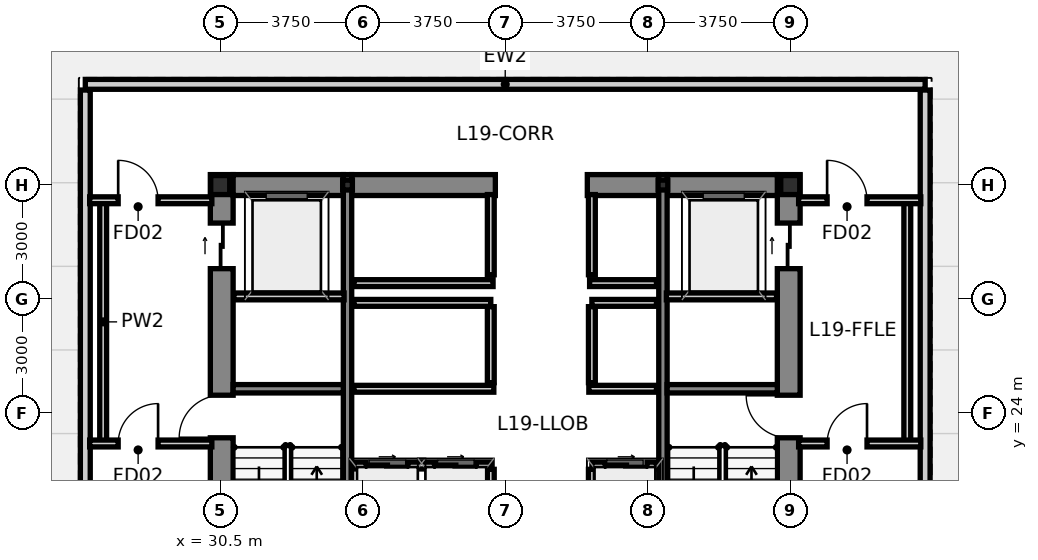
"""IFC4 building model, lengths in metres.
Left out: names, types, materials, properties, quantities, classifications, styles, units other than length and angle.
Written with IfcOpenShell. Run it as: python <this file> out.ifc"""

import sys

from ifc_helpers import new_model, si_unit, direction, frame, frame_2d, origin, origin_2d, place, context, subcontext, project, spatial, rectangle, i_section, extrude, source, transform, mapped, element, fill, save


model = new_model("IFC4")
c1 = context("Model", 3, precision=1e-05, world=origin(), true_north=direction((0.0, 1.0)))
c2 = subcontext(c1, "Body", "Model", "MODEL_VIEW")
j1 = project(units=[si_unit("LENGTHUNIT", "METRE"), si_unit("PLANEANGLEUNIT", "RADIAN")], contexts=[c1])
p1 = place(None, origin())
s1 = spatial("IfcSite", under=j1, at=p1, CompositionType="ELEMENT")
p2 = place(p1, origin())
s2 = spatial("IfcBuilding", under=s1, at=p2, CompositionType="ELEMENT")
p3 = place(p2, frame((0.0, 0.0, 75.05)))
s3 = spatial("IfcBuildingStorey", under=s2, at=p3, CompositionType="ELEMENT", Elevation=75.05)
m1 = source(origin(), c2, "Body", "SweptSolid", [
    extrude(i_section(OverallWidth=0.5, OverallDepth=0.5, WebThickness=0.028, FlangeThickness=0.04, at=origin_2d()), origin(), (0.0, 0.0, 1.0), 4.8),
])
for number, where, z_axis, x_axis in (
    (1, (45.5, 30.0, 0.0), (0.0, 0.0, 1.0), (1.0, 0.0, 0.0)),
    (2, (30.5, 30.0, 0.0), (0.0, 0.0, 1.0), (1.0, 0.0, 0.0)),
):
    element("IfcColumn", number, at=place(p3, frame(where, z_axis=z_axis, x_axis=x_axis)), inside=s3, PredefinedType="COLUMN", context=c2, shape_type="MappedRepresentation", body=[
        mapped(m1, transform((0.0, 0.0, 0.0), scale=1.0)),
    ])
m2 = source(origin(), c2, "Body", "SweptSolid", [
    extrude(i_section(OverallWidth=0.256, OverallDepth=0.26, WebThickness=0.01, FlangeThickness=0.017, at=origin_2d()), origin(), (0.0, 0.0, 1.0), 4.8),
])
for number, where, z_axis, x_axis in (
    (3, (33.85, 30.0, 0.0), (0.0, 0.0, 1.0), (1.0, 0.0, 0.0)),
    (4, (42.15, 30.0, 0.0), (0.0, 0.0, 1.0), (1.0, 0.0, 0.0)),
):
    element("IfcColumn", number, at=place(p3, frame(where, z_axis=z_axis, x_axis=x_axis)), inside=s3, PredefinedType="COLUMN", context=c2, shape_type="MappedRepresentation", body=[
        mapped(m2, transform((0.0, 0.0, 0.0), scale=1.0)),
    ])
p4 = place(p3, frame((30.54, 16.85, 0.0), z_axis=(0.0, 0.0, 1.0), x_axis=(0.0, 1.0, 0.0)))
e5 = element("IfcWall", 5, at=p4, inside=s3, PredefinedType="SHEAR", context=c2, shape_type="SweptSolid", body=[
    extrude(rectangle(XDim=13.425, YDim=0.6, at=frame_2d((6.712, 0.0))), origin(), (0.0, 0.0, 1.0), 4.8),
])
p5 = place(p4, frame((6.5, 0.0, 0.0)))
e6 = element("IfcOpeningElement", 6, at=p5, cuts=e5, PredefinedType="OPENING", context=c2, shape_type="SweptSolid", body=[
    extrude(rectangle(XDim=1.12, YDim=2.15, at=frame_2d((0.56, 1.075))), frame((0.0, 0.312, 0.0), z_axis=(0.0, -1.0, 0.0), x_axis=(1.0, 0.0, 0.0)), (0.0, 0.0, 1.0), 0.624),
])
p6 = place(p4, frame((10.95, 0.0, 0.0)))
e7 = element("IfcOpeningElement", 7, at=p6, cuts=e5, PredefinedType="OPENING", context=c2, shape_type="SweptSolid", body=[
    extrude(rectangle(XDim=1.2, YDim=2.2, at=frame_2d((0.6, 1.1))), frame((0.0, 0.312, 0.0), z_axis=(0.0, -1.0, 0.0), x_axis=(1.0, 0.0, 0.0)), (0.0, 0.0, 1.0), 0.624),
])
p7 = place(p3, frame((45.46, 16.85, 0.0), z_axis=(0.0, 0.0, 1.0), x_axis=(0.0, 1.0, 0.0)))
e8 = element("IfcWall", 8, at=p7, inside=s3, PredefinedType="SHEAR", context=c2, shape_type="SweptSolid", body=[
    extrude(rectangle(XDim=13.425, YDim=0.6, at=frame_2d((6.712, 0.0))), origin(), (0.0, 0.0, 1.0), 4.8),
])
p8 = place(p7, frame((6.5, 0.0, 0.0)))
e9 = element("IfcOpeningElement", 9, at=p8, cuts=e8, PredefinedType="OPENING", context=c2, shape_type="SweptSolid", body=[
    extrude(rectangle(XDim=1.12, YDim=2.15, at=frame_2d((0.56, 1.075))), frame((0.0, 0.312, 0.0), z_axis=(0.0, -1.0, 0.0), x_axis=(1.0, 0.0, 0.0)), (0.0, 0.0, 1.0), 0.624),
])
p9 = place(p7, frame((10.95, 0.0, 0.0)))
e10 = element("IfcOpeningElement", 10, at=p9, cuts=e8, PredefinedType="OPENING", context=c2, shape_type="SweptSolid", body=[
    extrude(rectangle(XDim=1.2, YDim=2.2, at=frame_2d((0.6, 1.1))), frame((0.0, 0.312, 0.0), z_axis=(0.0, -1.0, 0.0), x_axis=(1.0, 0.0, 0.0)), (0.0, 0.0, 1.0), 0.624),
])
p10 = place(p3, frame((30.84, 30.0, 0.0), z_axis=(0.0, 0.0, 1.0), x_axis=(1.0, 0.0, 0.0)))
e11 = element("IfcWall", 11, at=p10, inside=s3, PredefinedType="SHEAR", context=c2, shape_type="SweptSolid", body=[
    extrude(rectangle(XDim=2.9, YDim=0.55, at=frame_2d((1.45, 0.0))), origin(), (0.0, 0.0, 1.0), 4.8),
])
p11 = place(p3, frame((33.96, 30.0, 0.0), z_axis=(0.0, 0.0, 1.0), x_axis=(1.0, 0.0, 0.0)))
e12 = element("IfcWall", 12, at=p11, inside=s3, PredefinedType="SHEAR", context=c2, shape_type="SweptSolid", body=[
    extrude(rectangle(XDim=3.78, YDim=0.55, at=frame_2d((1.89, 0.0))), origin(), (0.0, 0.0, 1.0), 4.8),
])
p12 = place(p3, frame((40.16, 30.0, 0.0), z_axis=(0.0, 0.0, 1.0), x_axis=(1.0, 0.0, 0.0)))
e13 = element("IfcWall", 13, at=p12, inside=s3, PredefinedType="SHEAR", context=c2, shape_type="SweptSolid", body=[
    extrude(rectangle(XDim=1.88, YDim=0.55, at=frame_2d((0.94, 0.0))), origin(), (0.0, 0.0, 1.0), 4.8),
])
p13 = place(p3, frame((42.26, 30.0, 0.0), z_axis=(0.0, 0.0, 1.0), x_axis=(1.0, 0.0, 0.0)))
e14 = element("IfcWall", 14, at=p13, inside=s3, PredefinedType="SHEAR", context=c2, shape_type="SweptSolid", body=[
    extrude(rectangle(XDim=2.9, YDim=0.55, at=frame_2d((1.45, 0.0))), origin(), (0.0, 0.0, 1.0), 4.8),
])
for number, where, z_axis, x_axis in (
    (15, (33.85, 16.85, 0.0), (0.0, 0.0, 1.0), (0.0, 1.0, 0.0)),
    (16, (42.15, 16.85, 0.0), (0.0, 0.0, 1.0), (0.0, 1.0, 0.0)),
):
    element("IfcWall", number, at=place(p3, frame(where, z_axis=z_axis, x_axis=x_axis)), inside=s3, PredefinedType="SHEAR", context=c2, shape_type="SweptSolid", body=[
        extrude(rectangle(XDim=13.425, YDim=0.22, at=frame_2d((6.712, 0.0))), origin(), (0.0, 0.0, 1.0), 4.8),
    ])
for number, where, z_axis, x_axis in (
    (17, (30.84, 24.64, 0.0), (0.0, 0.0, 1.0), (1.0, 0.0, 0.0)),
    (18, (42.26, 24.64, 0.0), (0.0, 0.0, 1.0), (1.0, 0.0, 0.0)),
):
    element("IfcWall", number, at=place(p3, frame(where, z_axis=z_axis, x_axis=x_axis)), inside=s3, PredefinedType="SHEAR", context=c2, shape_type="SweptSolid", body=[
        extrude(rectangle(XDim=2.9, YDim=0.22, at=frame_2d((1.45, 0.0))), origin(), (0.0, 0.0, 1.0), 4.8),
    ])
p14 = place(p3, frame((26.95, 32.65, 0.0), z_axis=(0.0, 0.0, 1.0), x_axis=(1.0, 0.0, 0.0)))
e19 = element("IfcWall", 19, at=p14, inside=s3, PredefinedType="STANDARD", context=c2, shape_type="SweptSolid", body=[
    extrude(rectangle(XDim=22.1, YDim=0.26, at=frame_2d((11.05, 0.0))), origin(), (0.0, 0.0, 1.0), 4.176),
])
p15 = place(p3, frame((26.95, 15.5, 0.0), z_axis=(0.0, 0.0, 1.0), x_axis=(0.0, 1.0, 0.0)))
e20 = element("IfcWall", 20, at=p15, inside=s3, PredefinedType="STANDARD", context=c2, shape_type="SweptSolid", body=[
    extrude(rectangle(XDim=17.0, YDim=0.26, at=frame_2d((8.5, 0.0))), origin(), (0.0, 0.0, 1.0), 4.176),
])
p16 = place(p15, frame((3.5, 0.0, 0.0)))
e21 = element("IfcOpeningElement", 21, at=p16, cuts=e20, PredefinedType="OPENING", context=c2, shape_type="SweptSolid", body=[
    extrude(rectangle(XDim=1.1, YDim=2.2, at=frame_2d((0.55, 1.1))), frame((0.0, 0.142, 0.0), z_axis=(0.0, -1.0, 0.0), x_axis=(1.0, 0.0, 0.0)), (0.0, 0.0, 1.0), 0.284),
])
p17 = place(p3, frame((49.05, 15.5, 0.0), z_axis=(0.0, 0.0, 1.0), x_axis=(0.0, 1.0, 0.0)))
e22 = element("IfcWall", 22, at=p17, inside=s3, PredefinedType="STANDARD", context=c2, shape_type="SweptSolid", body=[
    extrude(rectangle(XDim=17.0, YDim=0.26, at=frame_2d((8.5, 0.0))), origin(), (0.0, 0.0, 1.0), 4.176),
])
p18 = place(p17, frame((3.5, 0.0, 0.0)))
e23 = element("IfcOpeningElement", 23, at=p18, cuts=e22, PredefinedType="OPENING", context=c2, shape_type="SweptSolid", body=[
    extrude(rectangle(XDim=1.1, YDim=2.2, at=frame_2d((0.55, 1.1))), frame((0.0, 0.142, 0.0), z_axis=(0.0, -1.0, 0.0), x_axis=(1.0, 0.0, 0.0)), (0.0, 0.0, 1.0), 0.284),
])
p19 = place(p3, frame((34.02, 22.62, 0.0), z_axis=(0.0, 0.0, 1.0), x_axis=(1.0, 0.0, 0.0)))
e24 = element("IfcWall", 24, at=p19, inside=s3, PredefinedType="PARTITIONING", context=c2, shape_type="SweptSolid", body=[
    extrude(rectangle(XDim=3.6, YDim=0.18, at=frame_2d((1.8, 0.0))), origin(), (0.0, 0.0, 1.0), 4.55),
])
p20 = place(p19, frame((0.32, 0.0, 0.0)))
e25 = element("IfcOpeningElement", 25, at=p20, cuts=e24, PredefinedType="OPENING", context=c2, shape_type="SweptSolid", body=[
    extrude(rectangle(XDim=1.1, YDim=2.2, at=frame_2d((0.55, 1.1))), frame((0.0, 0.102, 0.0), z_axis=(0.0, -1.0, 0.0), x_axis=(1.0, 0.0, 0.0)), (0.0, 0.0, 1.0), 0.204),
])
p21 = place(p19, frame((2.12, 0.0, 0.0)))
e26 = element("IfcOpeningElement", 26, at=p21, cuts=e24, PredefinedType="OPENING", context=c2, shape_type="SweptSolid", body=[
    extrude(rectangle(XDim=1.1, YDim=2.2, at=frame_2d((0.55, 1.1))), frame((0.0, 0.102, 0.0), z_axis=(0.0, -1.0, 0.0), x_axis=(1.0, 0.0, 0.0)), (0.0, 0.0, 1.0), 0.204),
])
p22 = place(p3, frame((40.28, 22.62, 0.0), z_axis=(0.0, 0.0, 1.0), x_axis=(1.0, 0.0, 0.0)))
e27 = element("IfcWall", 27, at=p22, inside=s3, PredefinedType="PARTITIONING", context=c2, shape_type="SweptSolid", body=[
    extrude(rectangle(XDim=1.7, YDim=0.18, at=frame_2d((0.85, 0.0))), origin(), (0.0, 0.0, 1.0), 4.55),
])
p23 = place(p22, frame((0.35, 0.0, 0.0)))
e28 = element("IfcOpeningElement", 28, at=p23, cuts=e27, PredefinedType="OPENING", context=c2, shape_type="SweptSolid", body=[
    extrude(rectangle(XDim=1.1, YDim=2.2, at=frame_2d((0.55, 1.1))), frame((0.0, 0.102, 0.0), z_axis=(0.0, -1.0, 0.0), x_axis=(1.0, 0.0, 0.0)), (0.0, 0.0, 1.0), 0.204),
])
for number, where, z_axis, x_axis in (
    (29, (37.62, 20.52, 0.0), (0.0, 0.0, 1.0), (0.0, 1.0, 0.0)),
    (30, (40.28, 20.52, 0.0), (0.0, 0.0, 1.0), (0.0, 1.0, 0.0)),
):
    element("IfcWall", number, at=place(p3, frame(where, z_axis=z_axis, x_axis=x_axis)), inside=s3, PredefinedType="PARTITIONING", context=c2, shape_type="SweptSolid", body=[
        extrude(rectangle(XDim=2.0, YDim=0.18, at=frame_2d((1.0, 0.0))), origin(), (0.0, 0.0, 1.0), 4.55),
    ])
p24 = place(p3, frame((34.02, 26.9, 0.0), z_axis=(0.0, 0.0, 1.0), x_axis=(1.0, 0.0, 0.0)))
e31 = element("IfcWall", 31, at=p24, inside=s3, PredefinedType="PARTITIONING", context=c2, shape_type="SweptSolid", body=[
    extrude(rectangle(XDim=3.6, YDim=0.18, at=frame_2d((1.8, 0.0))), origin(), (0.0, 0.0, 1.0), 4.55),
])
p25 = place(p3, frame((40.28, 26.9, 0.0), z_axis=(0.0, 0.0, 1.0), x_axis=(1.0, 0.0, 0.0)))
e32 = element("IfcWall", 32, at=p25, inside=s3, PredefinedType="PARTITIONING", context=c2, shape_type="SweptSolid", body=[
    extrude(rectangle(XDim=1.7, YDim=0.18, at=frame_2d((0.85, 0.0))), origin(), (0.0, 0.0, 1.0), 4.55),
])
for number, where, z_axis, x_axis in (
    (33, (37.62, 24.8, 0.0), (0.0, 0.0, 1.0), (0.0, 1.0, 0.0)),
    (34, (40.28, 24.8, 0.0), (0.0, 0.0, 1.0), (0.0, 1.0, 0.0)),
):
    element("IfcWall", number, at=place(p3, frame(where, z_axis=z_axis, x_axis=x_axis)), inside=s3, PredefinedType="PARTITIONING", context=c2, shape_type="SweptSolid", body=[
        extrude(rectangle(XDim=2.0, YDim=0.18, at=frame_2d((1.0, 0.0))), origin(), (0.0, 0.0, 1.0), 4.55),
    ])
p26 = place(p3, frame((34.02, 24.64, 0.0), z_axis=(0.0, 0.0, 1.0), x_axis=(1.0, 0.0, 0.0)))
e35 = element("IfcWall", 35, at=p26, inside=s3, PredefinedType="PARTITIONING", context=c2, shape_type="SweptSolid", body=[
    extrude(rectangle(XDim=3.68, YDim=0.18, at=frame_2d((1.84, 0.0))), origin(), (0.0, 0.0, 1.0), 4.55),
])
p27 = place(p3, frame((40.2, 24.64, 0.0), z_axis=(0.0, 0.0, 1.0), x_axis=(1.0, 0.0, 0.0)))
e36 = element("IfcWall", 36, at=p27, inside=s3, PredefinedType="PARTITIONING", context=c2, shape_type="SweptSolid", body=[
    extrude(rectangle(XDim=1.78, YDim=0.18, at=frame_2d((0.89, 0.0))), origin(), (0.0, 0.0, 1.0), 4.55),
])
p28 = place(p3, frame((34.02, 27.42, 0.0), z_axis=(0.0, 0.0, 1.0), x_axis=(1.0, 0.0, 0.0)))
e37 = element("IfcWall", 37, at=p28, inside=s3, PredefinedType="PARTITIONING", context=c2, shape_type="SweptSolid", body=[
    extrude(rectangle(XDim=3.66, YDim=0.18, at=frame_2d((1.83, 0.0))), origin(), (0.0, 0.0, 1.0), 4.55),
])
p29 = place(p3, frame((40.22, 27.42, 0.0), z_axis=(0.0, 0.0, 1.0), x_axis=(1.0, 0.0, 0.0)))
e38 = element("IfcWall", 38, at=p29, inside=s3, PredefinedType="PARTITIONING", context=c2, shape_type="SweptSolid", body=[
    extrude(rectangle(XDim=1.76, YDim=0.18, at=frame_2d((0.88, 0.0))), origin(), (0.0, 0.0, 1.0), 4.55),
])
for number, where, z_axis, x_axis in (
    (39, (37.62, 27.64, 0.0), (0.0, 0.0, 1.0), (0.0, 1.0, 0.0)),
    (40, (40.28, 27.64, 0.0), (0.0, 0.0, 1.0), (0.0, 1.0, 0.0)),
):
    element("IfcWall", number, at=place(p3, frame(where, z_axis=z_axis, x_axis=x_axis)), inside=s3, PredefinedType="PARTITIONING", context=c2, shape_type="SweptSolid", body=[
        extrude(rectangle(XDim=2.11, YDim=0.18, at=frame_2d((1.055, 0.0))), origin(), (0.0, 0.0, 1.0), 4.55),
    ])
p30 = place(p3, frame((27.42, 23.2, 0.0), z_axis=(0.0, 0.0, 1.0), x_axis=(0.0, 1.0, 0.0)))
e41 = element("IfcWall", 41, at=p30, inside=s3, PredefinedType="PARTITIONING", context=c2, shape_type="SweptSolid", body=[
    extrude(rectangle(XDim=6.4, YDim=0.18, at=frame_2d((3.2, 0.0))), origin(), (0.0, 0.0, 1.0), 4.176),
])
p31 = place(p3, frame((27.065, 23.2, 0.0), z_axis=(0.0, 0.0, 1.0), x_axis=(1.0, 0.0, 0.0)))
e42 = element("IfcWall", 42, at=p31, inside=s3, PredefinedType="PARTITIONING", context=c2, shape_type="SweptSolid", body=[
    extrude(rectangle(XDim=3.215, YDim=0.18, at=frame_2d((1.607, 0.0))), origin(), (0.0, 0.0, 1.0), 4.55),
])
p32 = place(p31, frame((0.75, 0.0, 0.0)))
e43 = element("IfcOpeningElement", 43, at=p32, cuts=e42, PredefinedType="OPENING", context=c2, shape_type="SweptSolid", body=[
    extrude(rectangle(XDim=1.05, YDim=2.15, at=frame_2d((0.525, 1.075))), frame((0.0, 0.102, 0.0), z_axis=(0.0, -1.0, 0.0), x_axis=(1.0, 0.0, 0.0)), (0.0, 0.0, 1.0), 0.204),
])
p33 = place(p3, frame((27.065, 29.6, 0.0), z_axis=(0.0, 0.0, 1.0), x_axis=(1.0, 0.0, 0.0)))
e44 = element("IfcWall", 44, at=p33, inside=s3, PredefinedType="PARTITIONING", context=c2, shape_type="SweptSolid", body=[
    extrude(rectangle(XDim=3.215, YDim=0.18, at=frame_2d((1.607, 0.0))), origin(), (0.0, 0.0, 1.0), 3.933),
])
p34 = place(p33, frame((0.75, 0.0, 0.0)))
e45 = element("IfcOpeningElement", 45, at=p34, cuts=e44, PredefinedType="OPENING", context=c2, shape_type="SweptSolid", body=[
    extrude(rectangle(XDim=1.05, YDim=2.15, at=frame_2d((0.525, 1.075))), frame((0.0, 0.102, 0.0), z_axis=(0.0, -1.0, 0.0), x_axis=(1.0, 0.0, 0.0)), (0.0, 0.0, 1.0), 0.204),
])
p35 = place(p3, frame((48.58, 23.2, 0.0), z_axis=(0.0, 0.0, 1.0), x_axis=(0.0, 1.0, 0.0)))
e46 = element("IfcWall", 46, at=p35, inside=s3, PredefinedType="PARTITIONING", context=c2, shape_type="SweptSolid", body=[
    extrude(rectangle(XDim=6.4, YDim=0.18, at=frame_2d((3.2, 0.0))), origin(), (0.0, 0.0, 1.0), 4.176),
])
p36 = place(p3, frame((45.72, 23.2, 0.0), z_axis=(0.0, 0.0, 1.0), x_axis=(1.0, 0.0, 0.0)))
e47 = element("IfcWall", 47, at=p36, inside=s3, PredefinedType="PARTITIONING", context=c2, shape_type="SweptSolid", body=[
    extrude(rectangle(XDim=3.215, YDim=0.18, at=frame_2d((1.607, 0.0))), origin(), (0.0, 0.0, 1.0), 4.55),
])
p37 = place(p36, frame((0.75, 0.0, 0.0)))
e48 = element("IfcOpeningElement", 48, at=p37, cuts=e47, PredefinedType="OPENING", context=c2, shape_type="SweptSolid", body=[
    extrude(rectangle(XDim=1.05, YDim=2.15, at=frame_2d((0.525, 1.075))), frame((0.0, 0.102, 0.0), z_axis=(0.0, -1.0, 0.0), x_axis=(1.0, 0.0, 0.0)), (0.0, 0.0, 1.0), 0.204),
])
p38 = place(p3, frame((45.72, 29.6, 0.0), z_axis=(0.0, 0.0, 1.0), x_axis=(1.0, 0.0, 0.0)))
e49 = element("IfcWall", 49, at=p38, inside=s3, PredefinedType="PARTITIONING", context=c2, shape_type="SweptSolid", body=[
    extrude(rectangle(XDim=3.215, YDim=0.18, at=frame_2d((1.607, 0.0))), origin(), (0.0, 0.0, 1.0), 3.933),
])
p39 = place(p38, frame((0.75, 0.0, 0.0)))
e50 = element("IfcOpeningElement", 50, at=p39, cuts=e49, PredefinedType="OPENING", context=c2, shape_type="SweptSolid", body=[
    extrude(rectangle(XDim=1.05, YDim=2.15, at=frame_2d((0.525, 1.075))), frame((0.0, 0.102, 0.0), z_axis=(0.0, -1.0, 0.0), x_axis=(1.0, 0.0, 0.0)), (0.0, 0.0, 1.0), 0.204),
])
for number, where, z_axis, x_axis in (
    (51, (30.86, 27.07, 0.0), (0.0, 0.0, 1.0), (1.0, 0.0, 0.0)),
    (52, (42.24, 27.07, 0.0), (0.0, 0.0, 1.0), (1.0, 0.0, 0.0)),
):
    element("IfcWall", number, at=place(p3, frame(where, z_axis=z_axis, x_axis=x_axis)), inside=s3, PredefinedType="PARTITIONING", context=c2, shape_type="SweptSolid", body=[
        extrude(rectangle(XDim=2.9, YDim=0.18, at=frame_2d((1.45, 0.0))), origin(), (0.0, 0.0, 1.0), 4.55),
    ])
p40 = place(p5, origin())
e53 = element("IfcDoor", 53, at=p40, inside=s3, OperationType="SINGLE_SWING_LEFT", PredefinedType="DOOR", context=c2, shape_type="SweptSolid", body=[
    extrude(rectangle(XDim=1.12, YDim=2.15, at=frame_2d((0.56, 1.075))), frame((0.0, 0.025, 0.0), z_axis=(0.0, -1.0, 0.0), x_axis=(1.0, 0.0, 0.0)), (0.0, 0.0, 1.0), 0.05),
])
fill(e6, e53)
p41 = place(p6, origin())
e54 = element("IfcDoor", 54, at=p41, inside=s3, OperationType="SLIDING_TO_LEFT", PredefinedType="DOOR", context=c2, shape_type="SweptSolid", body=[
    extrude(rectangle(XDim=1.2, YDim=2.2, at=frame_2d((0.6, 1.1))), frame((0.0, 0.025, 0.0), z_axis=(0.0, -1.0, 0.0), x_axis=(1.0, 0.0, 0.0)), (0.0, 0.0, 1.0), 0.05),
])
fill(e7, e54)
p42 = place(p8, origin())
e55 = element("IfcDoor", 55, at=p42, inside=s3, OperationType="SINGLE_SWING_RIGHT", PredefinedType="DOOR", context=c2, shape_type="SweptSolid", body=[
    extrude(rectangle(XDim=1.12, YDim=2.15, at=frame_2d((0.56, 1.075))), frame((0.0, 0.025, 0.0), z_axis=(0.0, -1.0, 0.0), x_axis=(1.0, 0.0, 0.0)), (0.0, 0.0, 1.0), 0.05),
])
fill(e9, e55)
p43 = place(p9, origin())
e56 = element("IfcDoor", 56, at=p43, inside=s3, OperationType="SLIDING_TO_RIGHT", PredefinedType="DOOR", context=c2, shape_type="SweptSolid", body=[
    extrude(rectangle(XDim=1.2, YDim=2.2, at=frame_2d((0.6, 1.1))), frame((0.0, 0.025, 0.0), z_axis=(0.0, -1.0, 0.0), x_axis=(1.0, 0.0, 0.0)), (0.0, 0.0, 1.0), 0.05),
])
fill(e10, e56)
p44 = place(p20, origin())
e57 = element("IfcDoor", 57, at=p44, inside=s3, OperationType="SLIDING_TO_LEFT", PredefinedType="DOOR", context=c2, shape_type="SweptSolid", body=[
    extrude(rectangle(XDim=1.1, YDim=2.2, at=frame_2d((0.55, 1.1))), frame((0.0, 0.025, 0.0), z_axis=(0.0, -1.0, 0.0), x_axis=(1.0, 0.0, 0.0)), (0.0, 0.0, 1.0), 0.05),
])
fill(e25, e57)
p45 = place(p21, origin())
e58 = element("IfcDoor", 58, at=p45, inside=s3, OperationType="SLIDING_TO_RIGHT", PredefinedType="DOOR", context=c2, shape_type="SweptSolid", body=[
    extrude(rectangle(XDim=1.1, YDim=2.2, at=frame_2d((0.55, 1.1))), frame((0.0, 0.025, 0.0), z_axis=(0.0, -1.0, 0.0), x_axis=(1.0, 0.0, 0.0)), (0.0, 0.0, 1.0), 0.05),
])
fill(e26, e58)
p46 = place(p23, origin())
e59 = element("IfcDoor", 59, at=p46, inside=s3, OperationType="SLIDING_TO_LEFT", PredefinedType="DOOR", context=c2, shape_type="SweptSolid", body=[
    extrude(rectangle(XDim=1.1, YDim=2.2, at=frame_2d((0.55, 1.1))), frame((0.0, 0.025, 0.0), z_axis=(0.0, -1.0, 0.0), x_axis=(1.0, 0.0, 0.0)), (0.0, 0.0, 1.0), 0.05),
])
fill(e28, e59)
p47 = place(p32, origin())
e60 = element("IfcDoor", 60, at=p47, inside=s3, OperationType="SINGLE_SWING_RIGHT", PredefinedType="DOOR", context=c2, shape_type="SweptSolid", body=[
    extrude(rectangle(XDim=1.05, YDim=2.15, at=frame_2d((0.525, 1.075))), frame((0.0, 0.025, 0.0), z_axis=(0.0, -1.0, 0.0), x_axis=(1.0, 0.0, 0.0)), (0.0, 0.0, 1.0), 0.05),
])
fill(e43, e60)
p48 = place(p34, origin())
e61 = element("IfcDoor", 61, at=p48, inside=s3, OperationType="SINGLE_SWING_LEFT", PredefinedType="DOOR", context=c2, shape_type="SweptSolid", body=[
    extrude(rectangle(XDim=1.05, YDim=2.15, at=frame_2d((0.525, 1.075))), frame((0.0, 0.025, 0.0), z_axis=(0.0, -1.0, 0.0), x_axis=(1.0, 0.0, 0.0)), (0.0, 0.0, 1.0), 0.05),
])
fill(e45, e61)
p49 = place(p37, origin())
e62 = element("IfcDoor", 62, at=p49, inside=s3, OperationType="SINGLE_SWING_RIGHT", PredefinedType="DOOR", context=c2, shape_type="SweptSolid", body=[
    extrude(rectangle(XDim=1.05, YDim=2.15, at=frame_2d((0.525, 1.075))), frame((0.0, 0.025, 0.0), z_axis=(0.0, -1.0, 0.0), x_axis=(1.0, 0.0, 0.0)), (0.0, 0.0, 1.0), 0.05),
])
fill(e48, e62)
p50 = place(p39, origin())
e63 = element("IfcDoor", 63, at=p50, inside=s3, OperationType="SINGLE_SWING_LEFT", PredefinedType="DOOR", context=c2, shape_type="SweptSolid", body=[
    extrude(rectangle(XDim=1.05, YDim=2.15, at=frame_2d((0.525, 1.075))), frame((0.0, 0.025, 0.0), z_axis=(0.0, -1.0, 0.0), x_axis=(1.0, 0.0, 0.0)), (0.0, 0.0, 1.0), 0.05),
])
fill(e50, e63)
save(model, sys.argv[1])
